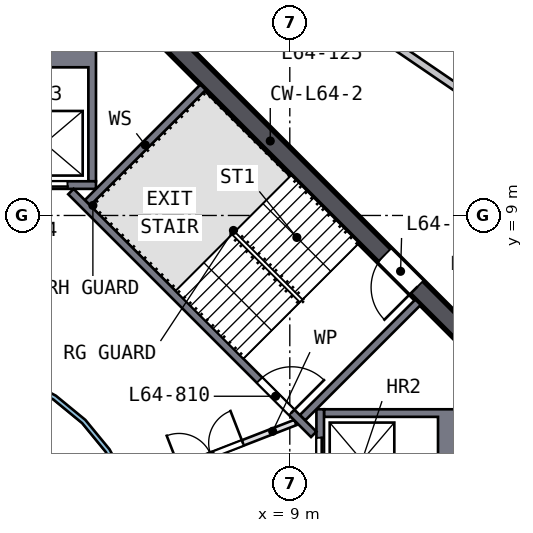
"""IFC4 building model, lengths in metres.
Left out: names, types, materials, properties, quantities, classifications, styles, units other than length and angle.
Written with IfcOpenShell. Run it as: python <this file> out.ifc"""

import sys

from ifc_helpers import new_model, si_unit, direction, frame, frame_2d, origin, place, context, subcontext, project, spatial, polyline, rectangle, outline, extrude, element, fill, save


model = new_model("IFC4")
c1 = context("Model", 3, precision=1e-05, world=origin(), true_north=direction((0.0, 1.0)))
c2 = subcontext(c1, "Body", "Model", "MODEL_VIEW")
j1 = project(units=[si_unit("LENGTHUNIT", "METRE"), si_unit("PLANEANGLEUNIT", "RADIAN")], contexts=[c1])
p1 = place(None, origin())
s1 = spatial("IfcSite", under=j1, at=p1, CompositionType="ELEMENT")
p2 = place(p1, origin())
s2 = spatial("IfcBuilding", under=s1, at=p2, CompositionType="ELEMENT")
p3 = place(p2, frame((0.0, 0.0, 259.5)))
s3 = spatial("IfcBuildingStorey", under=s2, at=p3, CompositionType="ELEMENT", Elevation=259.5)
p4 = place(p3, frame((13.823, 5.622, 0.0), z_axis=(0.0, 0.0, 1.0), x_axis=(-0.707106781, 0.707106781, 0.0)))
e1 = element("IfcWall", 1, at=p4, inside=s3, PredefinedType="SHEAR", context=c2, shape_type="SweptSolid", body=[
    extrude(rectangle(XDim=11.598, YDim=0.5, at=frame_2d((5.799, 0.0))), origin(), (0.0, 0.0, 1.0), 3.5),
])
p5 = place(p4, frame((2.099, 0.0, 0.0)))
e2 = element("IfcOpeningElement", 2, at=p5, cuts=e1, PredefinedType="OPENING", context=c2, shape_type="SweptSolid", body=[
    extrude(rectangle(XDim=1.2, YDim=2.1, at=frame_2d((0.6, 1.05))), frame((0.0, 0.26, 0.0), z_axis=(0.0, -1.0, 0.0), x_axis=(1.0, 0.0, 0.0)), (0.0, 0.0, 1.0), 0.52),
])
p6 = place(p3, origin())
e3 = element("IfcWall", 3, at=p6, inside=s3, PredefinedType="SOLIDWALL", context=c2, shape_type="SweptSolid", body=[
    extrude(outline(polyline([(13.5, 3.9), (13.5, 1.2), (9.9, 1.2), (9.9, 1.4), (12.9, 1.4), (12.9, 3.7), (9.9, 3.7), (9.9, 3.9), (13.5, 3.9)])), origin(), (0.0, 0.0, 1.0), 3.0),
])
p7 = place(p3, frame((9.8, 1.2, 0.0), z_axis=(0.0, 0.0, 1.0), x_axis=(0.0, 1.0, 0.0)))
e4 = element("IfcWall", 4, at=p7, inside=s3, PredefinedType="SOLIDWALL", context=c2, shape_type="SweptSolid", body=[
    extrude(rectangle(XDim=2.7, YDim=0.2, at=frame_2d((1.35, 0.0))), origin(), (0.0, 0.0, 1.0), 3.0),
])
p8 = place(p7, frame((0.75, 0.0, 0.0)))
e5 = element("IfcOpeningElement", 5, at=p8, cuts=e4, PredefinedType="OPENING", context=c2, shape_type="SweptSolid", body=[
    extrude(rectangle(XDim=1.2, YDim=2.1, at=frame_2d((0.6, 1.05))), frame((0.0, 0.11, 0.0), z_axis=(0.0, -1.0, 0.0), x_axis=(1.0, 0.0, 0.0)), (0.0, 0.0, 1.0), 0.22),
])
p9 = place(p3, origin())
e6 = element("IfcWall", 6, at=p9, inside=s3, PredefinedType="SOLIDWALL", context=c2, shape_type="SweptSolid", body=[
    extrude(outline(polyline([(3.9, 9.9), (3.7, 9.9), (3.7, 12.9), (1.4, 12.9), (1.4, 9.9), (1.2, 9.9), (1.2, 13.5), (3.9, 13.5), (3.9, 9.9)])), origin(), (0.0, 0.0, 1.0), 3.0),
])
p10 = place(p3, frame((1.2, 9.8, 0.0), z_axis=(0.0, 0.0, 1.0), x_axis=(1.0, 0.0, 0.0)))
e7 = element("IfcWall", 7, at=p10, inside=s3, PredefinedType="SOLIDWALL", context=c2, shape_type="SweptSolid", body=[
    extrude(rectangle(XDim=2.7, YDim=0.2, at=frame_2d((1.35, 0.0))), origin(), (0.0, 0.0, 1.0), 3.0),
])
p11 = place(p10, frame((0.75, 0.0, 0.0)))
e8 = element("IfcOpeningElement", 8, at=p11, cuts=e7, PredefinedType="OPENING", context=c2, shape_type="SweptSolid", body=[
    extrude(rectangle(XDim=1.2, YDim=2.1, at=frame_2d((0.6, 1.05))), frame((0.0, 0.11, 0.0), z_axis=(0.0, -1.0, 0.0), x_axis=(1.0, 0.0, 0.0)), (0.0, 0.0, 1.0), 0.22),
])
p12 = place(p3, frame((3.24, 9.629, 0.0), z_axis=(0.0, 0.0, 1.0), x_axis=(0.707106781, -0.707106781, 0.0)))
e9 = element("IfcWall", 9, at=p12, inside=s3, PredefinedType="SOLIDWALL", context=c2, shape_type="SweptSolid", body=[
    extrude(rectangle(XDim=9.036, YDim=0.2, at=frame_2d((4.518, 0.0))), origin(), (0.0, 0.0, 1.0), 3.0),
])
p13 = place(p12, frame((7.018, 0.0, 0.0)))
e10 = element("IfcOpeningElement", 10, at=p13, cuts=e9, PredefinedType="OPENING", context=c2, shape_type="SweptSolid", body=[
    extrude(rectangle(XDim=1.2, YDim=2.1, at=frame_2d((0.6, 1.05))), frame((0.0, 0.11, 0.0), z_axis=(0.0, -1.0, 0.0), x_axis=(1.0, 0.0, 0.0)), (0.0, 0.0, 1.0), 0.22),
])
for number, where, z_axis, x_axis in (
    (11, (9.334, 3.677, 0.0), (0.0, 0.0, 1.0), (0.707, 0.707, 0.0)),
    (12, (3.677, 9.334, 0.0), (0.0, 0.0, 1.0), (0.707, 0.707, 0.0)),
):
    element("IfcWall", number, at=place(p3, frame(where, z_axis=z_axis, x_axis=x_axis)), inside=s3, PredefinedType="SOLIDWALL", context=c2, shape_type="SweptSolid", body=[
        extrude(rectangle(XDim=4.3, YDim=0.2, at=frame_2d((2.15, 0.0))), origin(), (0.0, 0.0, 1.0), 3.0),
    ])
p14 = place(p3, frame((4.782, 1.857, 0.0), z_axis=(0.0, 0.0, 1.0), x_axis=(0.932155279, 0.362058746, 0.0)))
e13 = element("IfcWall", 13, at=p14, inside=s3, PredefinedType="PARTITIONING", context=c2, shape_type="SweptSolid", body=[
    extrude(rectangle(XDim=4.682, YDim=0.15, at=frame_2d((2.341, 0.0))), origin(), (0.0, 0.0, 1.0), 3.0),
])
p15 = place(p14, frame((1.4, 0.0, 0.0)))
e14 = element("IfcOpeningElement", 14, at=p15, cuts=e13, PredefinedType="OPENING", context=c2, shape_type="SweptSolid", body=[
    extrude(rectangle(XDim=1.8, YDim=2.1, at=frame_2d((0.9, 1.05))), frame((0.0, 0.085, 0.0), z_axis=(0.0, -1.0, 0.0), x_axis=(1.0, 0.0, 0.0)), (0.0, 0.0, 1.0), 0.17),
])
p16 = place(p3, origin())
e15 = element("IfcWall", 15, at=p16, inside=s3, PredefinedType="SOLIDWALL", context=c2, shape_type="SweptSolid", body=[
    extrude(outline(polyline([(5.021, -0.999), (4.73, -1.959), (4.257, -2.844), (3.62, -3.62), (2.844, -4.257), (1.959, -4.73), (0.999, -5.021), (0.0, -5.12), (-0.999, -5.021), (-1.959, -4.73), (-2.844, -4.257), (-3.62, -3.62), (-4.257, -2.844), (-4.73, -1.959), (-5.021, -0.999), (-5.12, 0.0), (-5.021, 0.999), (-4.73, 1.959), (-4.257, 2.844), (-3.62, 3.62), (-2.844, 4.257), (-1.959, 4.73), (-0.999, 5.021), (0.0, 5.12), (0.999, 5.021), (1.959, 4.73), (2.844, 4.257), (3.62, 3.62), (4.257, 2.844), (4.73, 1.959), (5.021, 0.999), (5.12, 0.0), (5.021, -0.999)]), holes=[polyline([(4.904, 0.976), (4.619, 1.913), (4.157, 2.778), (3.535, 3.535), (2.778, 4.157), (1.913, 4.619), (0.976, 4.904), (0.0, 5.0), (-0.976, 4.904), (-1.913, 4.619), (-2.778, 4.157), (-3.535, 3.535), (-4.157, 2.778), (-4.619, 1.913), (-4.904, 0.976), (-5.0, 0.0), (-4.904, -0.976), (-4.619, -1.913), (-4.157, -2.778), (-3.535, -3.535), (-2.778, -4.157), (-1.913, -4.619), (-0.976, -4.904), (0.0, -5.0), (0.976, -4.904), (1.913, -4.619), (2.778, -4.157), (3.535, -3.535), (4.157, -2.778), (4.619, -1.913), (4.904, -0.976), (5.0, 0.0), (4.904, 0.976)])]), origin(), (0.0, 0.0, 1.0), 3.0),
])
p17 = place(p3, frame((6.083, 17.349, 0.0), z_axis=(0.0, 0.0, 1.0), x_axis=(0.825903966, -0.563810818, 0.0)))
e16 = element("IfcWall", 16, at=p17, inside=s3, PredefinedType="SOLIDWALL", context=c2, shape_type="SweptSolid", body=[
    extrude(rectangle(XDim=9.316, YDim=0.2, at=frame_2d((4.658, 0.0))), origin(), (0.0, 0.0, 1.0), 3.0),
])
p18 = place(p17, frame((5.15, 0.0, 0.0)))
e17 = element("IfcOpeningElement", 17, at=p18, cuts=e16, PredefinedType="OPENING", context=c2, shape_type="SweptSolid", body=[
    extrude(rectangle(XDim=1.0, YDim=2.1, at=frame_2d((0.5, 1.05))), frame((0.0, 0.11, 0.0), z_axis=(0.0, -1.0, 0.0), x_axis=(1.0, 0.0, 0.0)), (0.0, 0.0, 1.0), 0.22),
])
p19 = place(p8, origin())
e18 = element("IfcDoor", 18, at=p19, inside=s3, OperationType="DOUBLE_DOOR_SLIDING", PredefinedType="DOOR", context=c2, shape_type="SweptSolid", body=[
    extrude(rectangle(XDim=1.2, YDim=2.1, at=frame_2d((0.6, 1.05))), frame((0.0, 0.025, 0.0), z_axis=(0.0, -1.0, 0.0), x_axis=(1.0, 0.0, 0.0)), (0.0, 0.0, 1.0), 0.05),
])
fill(e5, e18)
p20 = place(p11, origin())
e19 = element("IfcDoor", 19, at=p20, inside=s3, OperationType="DOUBLE_DOOR_SLIDING", PredefinedType="DOOR", context=c2, shape_type="SweptSolid", body=[
    extrude(rectangle(XDim=1.2, YDim=2.1, at=frame_2d((0.6, 1.05))), frame((0.0, 0.025, 0.0), z_axis=(0.0, -1.0, 0.0), x_axis=(1.0, 0.0, 0.0)), (0.0, 0.0, 1.0), 0.05),
])
fill(e8, e19)
p21 = place(p13, origin())
e20 = element("IfcDoor", 20, at=p21, inside=s3, OperationType="SINGLE_SWING_RIGHT", PredefinedType="DOOR", context=c2, shape_type="SweptSolid", body=[
    extrude(rectangle(XDim=1.2, YDim=2.1, at=frame_2d((0.6, 1.05))), frame((0.0, 0.025, 0.0), z_axis=(0.0, -1.0, 0.0), x_axis=(1.0, 0.0, 0.0)), (0.0, 0.0, 1.0), 0.05),
])
fill(e10, e20)
p22 = place(p5, origin())
e21 = element("IfcDoor", 21, at=p22, inside=s3, OperationType="SINGLE_SWING_LEFT", PredefinedType="DOOR", context=c2, shape_type="SweptSolid", body=[
    extrude(rectangle(XDim=1.2, YDim=2.1, at=frame_2d((0.6, 1.05))), frame((0.0, 0.025, 0.0), z_axis=(0.0, -1.0, 0.0), x_axis=(1.0, 0.0, 0.0)), (0.0, 0.0, 1.0), 0.05),
])
fill(e2, e21)
p23 = place(p15, origin())
e22 = element("IfcDoor", 22, at=p23, inside=s3, OperationType="DOUBLE_DOOR_SINGLE_SWING", PredefinedType="DOOR", context=c2, shape_type="SweptSolid", body=[
    extrude(rectangle(XDim=1.8, YDim=2.1, at=frame_2d((0.9, 1.05))), frame((0.0, 0.025, 0.0), z_axis=(0.0, -1.0, 0.0), x_axis=(1.0, 0.0, 0.0)), (0.0, 0.0, 1.0), 0.05),
])
fill(e14, e22)
save(model, sys.argv[1])
